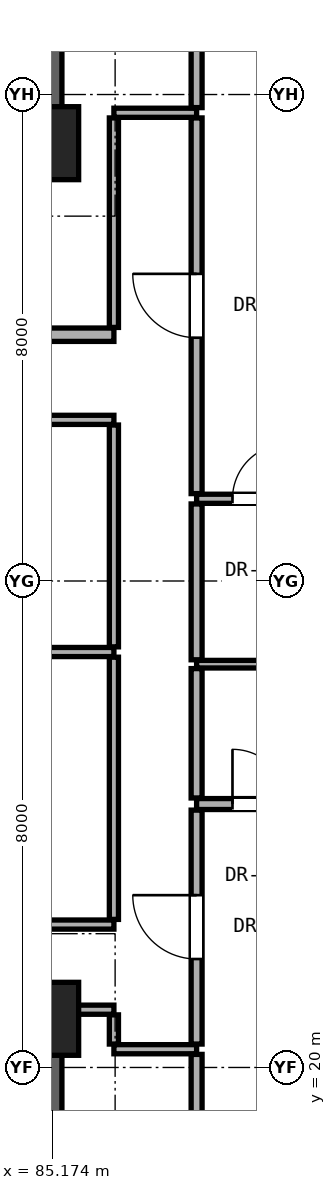
"""IFC4 building model, lengths in metres.
Left out: names, types, materials, properties, quantities, classifications, styles, units other than length and angle.
Written with IfcOpenShell. Run it as: python <this file> out.ifc"""

import sys

from ifc_helpers import new_model, si_unit, direction, frame, frame_2d, origin, origin_2d, place, context, subcontext, project, spatial, rectangle, extrude, element, fill, save


model = new_model("IFC4")
c1 = context("Model", 3, precision=1e-05, world=origin(), true_north=direction((0.0, 1.0)))
c2 = subcontext(c1, "Body", "Model", "MODEL_VIEW")
j1 = project(units=[si_unit("LENGTHUNIT", "METRE"), si_unit("PLANEANGLEUNIT", "RADIAN")], contexts=[c1])
p1 = place(None, origin())
s1 = spatial("IfcSite", under=j1, at=p1, CompositionType="ELEMENT")
p2 = place(p1, origin())
s2 = spatial("IfcBuilding", under=s1, at=p2, CompositionType="ELEMENT")
p3 = place(p2, frame((0.0, 0.0, 114.8)))
s3 = spatial("IfcBuildingStorey", under=s2, at=p3, CompositionType="ELEMENT", Elevation=114.8)
for number, where, z_axis, x_axis in (
    (1, (85.0, 20.8, 0.0), (0.0, 0.0, 1.0), (1.0, 0.0, 0.0)),
    (2, (85.0, 35.2, 0.0), (0.0, 0.0, 1.0), (1.0, 0.0, 0.0)),
):
    element("IfcColumn", number, at=place(p3, frame(where, z_axis=z_axis, x_axis=x_axis)), inside=s3, PredefinedType="COLUMN", context=c2, shape_type="SweptSolid", body=[
        extrude(rectangle(XDim=1.2, YDim=1.2, at=origin_2d()), origin(), (0.0, 0.0, 1.0), 3.3),
    ])
for number, where, z_axis, x_axis in (
    (3, (85.0, 35.2, 0.0), (0.0, 0.0, 1.0), (0.0, 1.0, 0.0)),
    (4, (85.0, 15.2, 0.0), (0.0, 0.0, 1.0), (0.0, 1.0, 0.0)),
):
    element("IfcWall", number, at=place(p3, frame(where, z_axis=z_axis, x_axis=x_axis)), inside=s3, PredefinedType="SHEAR", context=c2, shape_type="SweptSolid", body=[
        extrude(rectangle(XDim=5.6, YDim=0.65, at=frame_2d((2.8, 0.0))), origin(), (0.0, 0.0, 1.0), 3.08),
    ])
p4 = place(p3, frame((86.18, 20.3, 0.0), z_axis=(0.0, 0.0, 1.0), x_axis=(1.0, 0.0, 0.0)))
e5 = element("IfcWall", 5, at=p4, inside=s3, PredefinedType="PARTITIONING", context=c2, shape_type="SweptSolid", body=[
    extrude(rectangle(XDim=1.36, YDim=0.15, at=frame_2d((0.68, 0.0))), origin(), (0.0, 0.0, 1.0), 3.08),
])
p5 = place(p3, frame((85.32, 20.95, 0.0), z_axis=(0.0, 0.0, 1.0), x_axis=(1.0, 0.0, 0.0)))
e6 = element("IfcWall", 6, at=p5, inside=s3, PredefinedType="PARTITIONING", context=c2, shape_type="SweptSolid", body=[
    extrude(rectangle(XDim=0.86, YDim=0.15, at=frame_2d((0.43, 0.0))), origin(), (0.0, 0.0, 1.0), 2.472),
])
p6 = place(p3, frame((66.68, 22.35, 0.0), z_axis=(0.0, 0.0, 1.0), x_axis=(1.0, 0.0, 0.0)))
e7 = element("IfcWall", 7, at=p6, inside=s3, PredefinedType="PARTITIONING", context=c2, shape_type="SweptSolid", body=[
    extrude(rectangle(XDim=19.5, YDim=0.15, at=frame_2d((9.75, 0.0))), origin(), (0.0, 0.0, 1.0), 2.145),
])
p7 = place(p6, frame((11.99, 0.0, 0.0)))
e8 = element("IfcOpeningElement", 8, at=p7, cuts=e7, PredefinedType="OPENING", context=c2, shape_type="SweptSolid", body=[
    extrude(rectangle(XDim=0.85, YDim=2.01, at=frame_2d((0.425, 1.005))), frame((0.0, 0.085, 0.0), z_axis=(0.0, -1.0, 0.0), x_axis=(1.0, 0.0, 0.0)), (0.0, 0.0, 1.0), 0.17),
])
p8 = place(p3, frame((87.54, 24.332, 0.0), z_axis=(0.0, 0.0, 1.0), x_axis=(1.0, 0.0, 0.0)))
e9 = element("IfcWall", 9, at=p8, inside=s3, PredefinedType="PARTITIONING", context=c2, shape_type="SweptSolid", body=[
    extrude(rectangle(XDim=8.006, YDim=0.18, at=frame_2d((4.003, 0.0))), origin(), (0.0, 0.0, 1.0), 2.216),
])
p9 = place(p8, frame((5.721, 0.0, 0.0)))
e10 = element("IfcOpeningElement", 10, at=p9, cuts=e9, PredefinedType="OPENING", context=c2, shape_type="SweptSolid", body=[
    extrude(rectangle(XDim=0.95, YDim=2.15, at=frame_2d((0.475, 1.075))), frame((0.0, 0.1, 0.0), z_axis=(0.0, -1.0, 0.0), x_axis=(1.0, 0.0, 0.0)), (0.0, 0.0, 1.0), 0.2),
])
p10 = place(p8, frame((2.758, 0.0, 0.0)))
e11 = element("IfcOpeningElement", 11, at=p10, cuts=e9, PredefinedType="OPENING", context=c2, shape_type="SweptSolid", body=[
    extrude(rectangle(XDim=0.95, YDim=2.15, at=frame_2d((0.475, 1.075))), frame((0.0, 0.1, 0.0), z_axis=(0.0, -1.0, 0.0), x_axis=(1.0, 0.0, 0.0)), (0.0, 0.0, 1.0), 0.2),
])
p11 = place(p8, frame((0.59, 0.0, 0.0)))
e12 = element("IfcOpeningElement", 12, at=p11, cuts=e9, PredefinedType="OPENING", context=c2, shape_type="SweptSolid", body=[
    extrude(rectangle(XDim=0.9, YDim=2.1, at=frame_2d((0.45, 1.05))), frame((0.0, 0.1, 0.0), z_axis=(0.0, -1.0, 0.0), x_axis=(1.0, 0.0, 0.0)), (0.0, 0.0, 1.0), 0.2),
])
p12 = place(p3, frame((87.54, 26.632, 0.0), z_axis=(0.0, 0.0, 1.0), x_axis=(1.0, 0.0, 0.0)))
e13 = element("IfcWall", 13, at=p12, inside=s3, PredefinedType="PARTITIONING", context=c2, shape_type="SweptSolid", body=[
    extrude(rectangle(XDim=8.006, YDim=0.125, at=frame_2d((4.003, 0.0))), origin(), (0.0, 0.0, 1.0), 2.216),
])
p13 = place(p3, frame((72.05, 26.832, 0.0), z_axis=(0.0, 0.0, 1.0), x_axis=(1.0, 0.0, 0.0)))
e14 = element("IfcWall", 14, at=p13, inside=s3, PredefinedType="PARTITIONING", context=c2, shape_type="SweptSolid", body=[
    extrude(rectangle(XDim=14.13, YDim=0.15, at=frame_2d((7.065, 0.0))), origin(), (0.0, 0.0, 1.0), 2.145),
])
p14 = place(p3, frame((87.54, 29.352, 0.0), z_axis=(0.0, 0.0, 1.0), x_axis=(1.0, 0.0, 0.0)))
e15 = element("IfcWall", 15, at=p14, inside=s3, PredefinedType="PARTITIONING", context=c2, shape_type="SweptSolid", body=[
    extrude(rectangle(XDim=8.006, YDim=0.15, at=frame_2d((4.003, 0.0))), origin(), (0.0, 0.0, 1.0), 2.216),
])
p15 = place(p14, frame((4.528, 0.0, 0.0)))
e16 = element("IfcOpeningElement", 16, at=p15, cuts=e15, PredefinedType="OPENING", context=c2, shape_type="SweptSolid", body=[
    extrude(rectangle(XDim=0.95, YDim=2.15, at=frame_2d((0.475, 1.075))), frame((0.0, 0.085, 0.0), z_axis=(0.0, -1.0, 0.0), x_axis=(1.0, 0.0, 0.0)), (0.0, 0.0, 1.0), 0.17),
])
p16 = place(p14, frame((0.59, 0.0, 0.0)))
e17 = element("IfcOpeningElement", 17, at=p16, cuts=e15, PredefinedType="OPENING", context=c2, shape_type="SweptSolid", body=[
    extrude(rectangle(XDim=0.9, YDim=2.1, at=frame_2d((0.45, 1.05))), frame((0.0, 0.085, 0.0), z_axis=(0.0, -1.0, 0.0), x_axis=(1.0, 0.0, 0.0)), (0.0, 0.0, 1.0), 0.17),
])
p17 = place(p3, frame((66.68, 30.65, 0.0), z_axis=(0.0, 0.0, 1.0), x_axis=(1.0, 0.0, 0.0)))
e18 = element("IfcWall", 18, at=p17, inside=s3, PredefinedType="PARTITIONING", context=c2, shape_type="SweptSolid", body=[
    extrude(rectangle(XDim=19.5, YDim=0.15, at=frame_2d((9.75, 0.0))), origin(), (0.0, 0.0, 1.0), 2.145),
])
p18 = place(p17, frame((3.795, 0.0, 0.0)))
e19 = element("IfcOpeningElement", 19, at=p18, cuts=e18, PredefinedType="OPENING", context=c2, shape_type="SweptSolid", body=[
    extrude(rectangle(XDim=0.85, YDim=2.01, at=frame_2d((0.425, 1.005))), frame((0.0, 0.085, 0.0), z_axis=(0.0, -1.0, 0.0), x_axis=(1.0, 0.0, 0.0)), (0.0, 0.0, 1.0), 0.17),
])
p19 = place(p17, frame((11.99, 0.0, 0.0)))
e20 = element("IfcOpeningElement", 20, at=p19, cuts=e18, PredefinedType="OPENING", context=c2, shape_type="SweptSolid", body=[
    extrude(rectangle(XDim=0.85, YDim=2.01, at=frame_2d((0.425, 1.005))), frame((0.0, 0.085, 0.0), z_axis=(0.0, -1.0, 0.0), x_axis=(1.0, 0.0, 0.0)), (0.0, 0.0, 1.0), 0.17),
])
p20 = place(p3, frame((71.55, 32.05, 0.0), z_axis=(0.0, 0.0, 1.0), x_axis=(1.0, 0.0, 0.0)))
e21 = element("IfcWall", 21, at=p20, inside=s3, PredefinedType="SOLIDWALL", context=c2, shape_type="SweptSolid", body=[
    extrude(rectangle(XDim=14.63, YDim=0.22, at=frame_2d((7.315, 0.0))), origin(), (0.0, 0.0, 1.0), 2.145),
])
p21 = place(p20, frame((6.065, 0.0, 0.0)))
e22 = element("IfcOpeningElement", 22, at=p21, cuts=e21, PredefinedType="OPENING", context=c2, shape_type="SweptSolid", body=[
    extrude(rectangle(XDim=0.85, YDim=2.01, at=frame_2d((0.425, 1.005))), frame((0.0, 0.12, 0.0), z_axis=(0.0, -1.0, 0.0), x_axis=(1.0, 0.0, 0.0)), (0.0, 0.0, 1.0), 0.24),
])
p22 = place(p20, frame((10.585, 0.0, 0.0)))
e23 = element("IfcOpeningElement", 23, at=p22, cuts=e21, PredefinedType="OPENING", context=c2, shape_type="SweptSolid", body=[
    extrude(rectangle(XDim=0.85, YDim=2.01, at=frame_2d((0.425, 1.005))), frame((0.0, 0.12, 0.0), z_axis=(0.0, -1.0, 0.0), x_axis=(1.0, 0.0, 0.0)), (0.0, 0.0, 1.0), 0.24),
])
p23 = place(p20, frame((1.65, 0.0, 0.0)))
e24 = element("IfcOpeningElement", 24, at=p23, cuts=e21, PredefinedType="OPENING", context=c2, shape_type="SweptSolid", body=[
    extrude(rectangle(XDim=0.85, YDim=2.01, at=frame_2d((0.425, 1.005))), frame((0.0, 0.12, 0.0), z_axis=(0.0, -1.0, 0.0), x_axis=(1.0, 0.0, 0.0)), (0.0, 0.0, 1.0), 0.24),
])
p24 = place(p3, frame((86.18, 35.7, 0.0), z_axis=(0.0, 0.0, 1.0), x_axis=(1.0, 0.0, 0.0)))
e25 = element("IfcWall", 25, at=p24, inside=s3, PredefinedType="PARTITIONING", context=c2, shape_type="SweptSolid", body=[
    extrude(rectangle(XDim=1.36, YDim=0.15, at=frame_2d((0.68, 0.0))), origin(), (0.0, 0.0, 1.0), 3.08),
])
p25 = place(p3, frame((86.18, 20.385, 0.0), z_axis=(0.0, 0.0, 1.0), x_axis=(0.0, 1.0, 0.0)))
e26 = element("IfcWall", 26, at=p25, inside=s3, PredefinedType="PARTITIONING", context=c2, shape_type="SweptSolid", body=[
    extrude(rectangle(XDim=0.48, YDim=0.15, at=frame_2d((0.24, 0.0))), origin(), (0.0, 0.0, 1.0), 2.472),
])
p26 = place(p3, frame((86.18, 22.435, 0.0), z_axis=(0.0, 0.0, 1.0), x_axis=(0.0, 1.0, 0.0)))
e27 = element("IfcWall", 27, at=p26, inside=s3, PredefinedType="PARTITIONING", context=c2, shape_type="SweptSolid", body=[
    extrude(rectangle(XDim=4.312, YDim=0.15, at=frame_2d((2.156, 0.0))), origin(), (0.0, 0.0, 1.0), 3.08),
])
p27 = place(p3, frame((86.18, 26.917, 0.0), z_axis=(0.0, 0.0, 1.0), x_axis=(0.0, 1.0, 0.0)))
e28 = element("IfcWall", 28, at=p27, inside=s3, PredefinedType="PARTITIONING", context=c2, shape_type="SweptSolid", body=[
    extrude(rectangle(XDim=3.648, YDim=0.15, at=frame_2d((1.824, 0.0))), origin(), (0.0, 0.0, 1.0), 2.299),
])
p28 = place(p3, frame((86.18, 32.17, 0.0), z_axis=(0.0, 0.0, 1.0), x_axis=(0.0, 1.0, 0.0)))
e29 = element("IfcWall", 29, at=p28, inside=s3, PredefinedType="PARTITIONING", context=c2, shape_type="SweptSolid", body=[
    extrude(rectangle(XDim=3.445, YDim=0.15, at=frame_2d((1.723, 0.0))), origin(), (0.0, 0.0, 1.0), 2.472),
])
p29 = place(p3, frame((87.54, 16.352, 0.0), z_axis=(0.0, 0.0, 1.0), x_axis=(0.0, 1.0, 0.0)))
e30 = element("IfcWall", 30, at=p29, inside=s3, PredefinedType="PARTITIONING", context=c2, shape_type="SweptSolid", body=[
    extrude(rectangle(XDim=3.863, YDim=0.18, at=frame_2d((1.932, 0.0))), origin(), (0.0, 0.0, 1.0), 2.456),
])
p30 = place(p3, frame((87.54, 20.385, 0.0), z_axis=(0.0, 0.0, 1.0), x_axis=(0.0, 1.0, 0.0)))
e31 = element("IfcWall", 31, at=p30, inside=s3, PredefinedType="PARTITIONING", context=c2, shape_type="SweptSolid", body=[
    extrude(rectangle(XDim=3.847, YDim=0.18, at=frame_2d((1.923, 0.0))), origin(), (0.0, 0.0, 1.0), 2.472),
])
p31 = place(p30, frame((1.398, 0.0, 0.0)))
e32 = element("IfcOpeningElement", 32, at=p31, cuts=e31, PredefinedType="OPENING", context=c2, shape_type="SweptSolid", body=[
    extrude(rectangle(XDim=1.05, YDim=2.2, at=frame_2d((0.525, 1.1))), frame((0.0, 0.1, 0.0), z_axis=(0.0, -1.0, 0.0), x_axis=(1.0, 0.0, 0.0)), (0.0, 0.0, 1.0), 0.2),
])
p32 = place(p3, frame((87.54, 24.432, 0.0), z_axis=(0.0, 0.0, 1.0), x_axis=(0.0, 1.0, 0.0)))
e33 = element("IfcWall", 33, at=p32, inside=s3, PredefinedType="PARTITIONING", context=c2, shape_type="SweptSolid", body=[
    extrude(rectangle(XDim=2.128, YDim=0.18, at=frame_2d((1.064, 0.0))), origin(), (0.0, 0.0, 1.0), 3.08),
])
p33 = place(p3, frame((87.54, 26.705, 0.0), z_axis=(0.0, 0.0, 1.0), x_axis=(0.0, 1.0, 0.0)))
e34 = element("IfcWall", 34, at=p33, inside=s3, PredefinedType="PARTITIONING", context=c2, shape_type="SweptSolid", body=[
    extrude(rectangle(XDim=2.562, YDim=0.18, at=frame_2d((1.281, 0.0))), origin(), (0.0, 0.0, 1.0), 2.299),
])
p34 = place(p3, frame((87.54, 29.437, 0.0), z_axis=(0.0, 0.0, 1.0), x_axis=(0.0, 1.0, 0.0)))
e35 = element("IfcWall", 35, at=p34, inside=s3, PredefinedType="PARTITIONING", context=c2, shape_type="SweptSolid", body=[
    extrude(rectangle(XDim=6.178, YDim=0.18, at=frame_2d((3.089, 0.0))), origin(), (0.0, 0.0, 1.0), 2.472),
])
p35 = place(p34, frame((2.564, 0.0, 0.0)))
e36 = element("IfcOpeningElement", 36, at=p35, cuts=e35, PredefinedType="OPENING", context=c2, shape_type="SweptSolid", body=[
    extrude(rectangle(XDim=1.05, YDim=2.2, at=frame_2d((0.525, 1.1))), frame((0.0, 0.1, 0.0), z_axis=(0.0, -1.0, 0.0), x_axis=(1.0, 0.0, 0.0)), (0.0, 0.0, 1.0), 0.2),
])
p36 = place(p3, frame((87.54, 35.785, 0.0), z_axis=(0.0, 0.0, 1.0), x_axis=(0.0, 1.0, 0.0)))
e37 = element("IfcWall", 37, at=p36, inside=s3, PredefinedType="PARTITIONING", context=c2, shape_type="SweptSolid", body=[
    extrude(rectangle(XDim=3.878, YDim=0.18, at=frame_2d((1.939, 0.0))), origin(), (0.0, 0.0, 1.0), 2.456),
])
p37 = place(p31, origin())
e38 = element("IfcDoor", 38, at=p37, inside=s3, OperationType="SINGLE_SWING_RIGHT", PredefinedType="DOOR", context=c2, shape_type="SweptSolid", body=[
    extrude(rectangle(XDim=1.05, YDim=2.2, at=frame_2d((0.525, 1.1))), frame((0.0, 0.025, 0.0), z_axis=(0.0, -1.0, 0.0), x_axis=(1.0, 0.0, 0.0)), (0.0, 0.0, 1.0), 0.05),
])
fill(e32, e38)
p38 = place(p11, origin())
e39 = element("IfcDoor", 39, at=p38, inside=s3, OperationType="SINGLE_SWING_LEFT", PredefinedType="DOOR", context=c2, shape_type="SweptSolid", body=[
    extrude(rectangle(XDim=0.9, YDim=2.1, at=frame_2d((0.45, 1.05))), frame((0.0, 0.025, 0.0), z_axis=(0.0, -1.0, 0.0), x_axis=(1.0, 0.0, 0.0)), (0.0, 0.0, 1.0), 0.05),
])
fill(e12, e39)
p39 = place(p35, origin())
e40 = element("IfcDoor", 40, at=p39, inside=s3, OperationType="SINGLE_SWING_RIGHT", PredefinedType="DOOR", context=c2, shape_type="SweptSolid", body=[
    extrude(rectangle(XDim=1.05, YDim=2.2, at=frame_2d((0.525, 1.1))), frame((0.0, 0.025, 0.0), z_axis=(0.0, -1.0, 0.0), x_axis=(1.0, 0.0, 0.0)), (0.0, 0.0, 1.0), 0.05),
])
fill(e36, e40)
p40 = place(p16, origin())
e41 = element("IfcDoor", 41, at=p40, inside=s3, OperationType="SINGLE_SWING_RIGHT", PredefinedType="DOOR", context=c2, shape_type="SweptSolid", body=[
    extrude(rectangle(XDim=0.9, YDim=2.1, at=frame_2d((0.45, 1.05))), frame((0.0, 0.025, 0.0), z_axis=(0.0, -1.0, 0.0), x_axis=(1.0, 0.0, 0.0)), (0.0, 0.0, 1.0), 0.05),
])
fill(e17, e41)
save(model, sys.argv[1])
